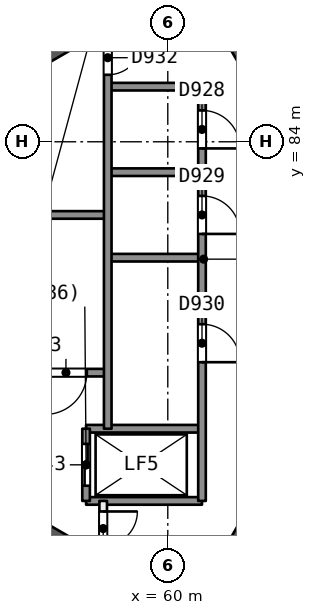
"""IFC4 building model, lengths in metres.
Left out: names, types, materials, properties, quantities, classifications, styles, units other than length and angle.
Written with IfcOpenShell. Run it as: python <this file> out.ifc"""

import sys

from ifc_helpers import new_model, si_unit, direction, frame, frame_2d, origin, place, context, subcontext, project, spatial, rectangle, extrude, element, fill, save


model = new_model("IFC4")
c1 = context("Model", 3, precision=1e-05, world=origin(), true_north=direction((0.0, 1.0)))
c2 = subcontext(c1, "Body", "Model", "MODEL_VIEW")
j1 = project(units=[si_unit("LENGTHUNIT", "METRE"), si_unit("PLANEANGLEUNIT", "RADIAN")], contexts=[c1])
p1 = place(None, origin())
s1 = spatial("IfcSite", under=j1, at=p1, CompositionType="ELEMENT")
p2 = place(p1, origin())
s2 = spatial("IfcBuilding", under=s1, at=p2, CompositionType="ELEMENT")
p3 = place(p2, frame((0.0, 0.0, 178.5)))
s3 = spatial("IfcBuildingStorey", under=s2, at=p3, CompositionType="ELEMENT", Elevation=178.5)
p4 = place(p3, frame((65.682, 80.0, 0.0), z_axis=(0.0, 0.0, 1.0), x_axis=(-0.500000202252, 0.866025287014, 0.0)))
e1 = element("IfcWall", 1, at=p4, inside=s3, PredefinedType="SHEAR", context=c2, shape_type="SweptSolid", body=[
    extrude(rectangle(XDim=10.221, YDim=0.55, at=frame_2d((5.111, 0.0))), origin(), (0.0, 0.0, 1.0), 3.7),
])
p5 = place(p4, frame((0.791, 0.0, 0.0)))
e2 = element("IfcOpeningElement", 2, at=p5, cuts=e1, PredefinedType="OPENING", context=c2, shape_type="SweptSolid", body=[
    extrude(rectangle(XDim=1.2, YDim=2.1, at=frame_2d((0.6, 1.05))), frame((0.0, 0.286, 0.0), z_axis=(0.0, -1.0, 0.0), x_axis=(1.0, 0.0, 0.0)), (0.0, 0.0, 1.0), 0.571),
])
p6 = place(p3, frame((60.709, 88.614, 0.0), z_axis=(0.0, 0.0, 1.0), x_axis=(-0.866020164116, -0.500009075263, 0.0)))
e3 = element("IfcWall", 3, at=p6, inside=s3, PredefinedType="SHEAR", context=c2, shape_type="SweptSolid", body=[
    extrude(rectangle(XDim=14.058, YDim=0.55, at=frame_2d((7.029, 0.0))), origin(), (0.0, 0.0, 1.0), 3.7),
])
p7 = place(p3, frame((48.672, 78.336, 0.0), z_axis=(0.0, 0.0, 1.0), x_axis=(0.866023530946, -0.500003243837, 0.0)))
e4 = element("IfcWall", 4, at=p7, inside=s3, PredefinedType="SHEAR", context=c2, shape_type="SweptSolid", body=[
    extrude(rectangle(XDim=14.175, YDim=0.55, at=frame_2d((7.087, 0.0))), origin(), (0.0, 0.0, 1.0), 3.7),
])
p8 = place(p3, frame((60.709, 71.386, 0.0), z_axis=(0.0, 0.0, 1.0), x_axis=(0.500015938302, 0.866016201606, 0.0)))
e5 = element("IfcWall", 5, at=p8, inside=s3, PredefinedType="SHEAR", context=c2, shape_type="SweptSolid", body=[
    extrude(rectangle(XDim=10.105, YDim=0.55, at=frame_2d((5.053, 0.0))), origin(), (0.0, 0.0, 1.0), 3.7),
])
p9 = place(p8, frame((7.955, 0.0, 0.0)))
e6 = element("IfcOpeningElement", 6, at=p9, cuts=e5, PredefinedType="OPENING", context=c2, shape_type="SweptSolid", body=[
    extrude(rectangle(XDim=1.2, YDim=2.1, at=frame_2d((0.6, 1.05))), frame((0.0, 0.286, 0.0), z_axis=(0.0, -1.0, 0.0), x_axis=(1.0, 0.0, 0.0)), (0.0, 0.0, 1.0), 0.571),
])
p10 = place(p3, frame((65.589, 82.765, 0.0), z_axis=(0.0, 0.0, 1.0), x_axis=(-0.5000018851, 0.866024315419, 0.0)))
e7 = element("IfcWall", 7, at=p10, inside=s3, PredefinedType="PARTITIONING", context=c2, shape_type="SweptSolid", body=[
    extrude(rectangle(XDim=9.0, YDim=0.2, at=frame_2d((4.5, 0.0))), origin(), (0.0, 0.0, 1.0), 3.25),
])
p11 = place(p3, frame((61.224, 69.363, 0.0), z_axis=(0.0, 0.0, 1.0), x_axis=(0.499990139034, 0.866031096941, 0.0)))
e8 = element("IfcWall", 8, at=p11, inside=s3, PredefinedType="PARTITIONING", context=c2, shape_type="SweptSolid", body=[
    extrude(rectangle(XDim=9.0, YDim=0.2, at=frame_2d((4.5, 0.0))), origin(), (0.0, 0.0, 1.0), 3.25),
])
p12 = place(p3, frame((42.71, 82.722, 0.0), z_axis=(0.0, 0.0, 1.0), x_axis=(0.866026647012, 0.499997846661, 0.0)))
e9 = element("IfcWall", 9, at=p12, inside=s3, PredefinedType="SOLIDWALL", context=c2, shape_type="SweptSolid", body=[
    extrude(rectangle(XDim=53.206, YDim=0.3, at=frame_2d((26.603, 0.0))), origin(), (0.0, 0.0, 1.0), 3.25),
])
p13 = place(p12, frame((30.391, 0.0, 0.0)))
e10 = element("IfcOpeningElement", 10, at=p13, cuts=e9, PredefinedType="OPENING", context=c2, shape_type="SweptSolid", body=[
    extrude(rectangle(XDim=2.4, YDim=2.4, at=frame_2d((1.2, 1.2))), frame((0.0, 0.161, 0.0), z_axis=(0.0, -1.0, 0.0), x_axis=(1.0, 0.0, 0.0)), (0.0, 0.0, 1.0), 0.321),
])
p14 = place(p12, frame((41.356, 0.0, 0.0)))
e11 = element("IfcOpeningElement", 11, at=p14, cuts=e9, PredefinedType="OPENING", context=c2, shape_type="SweptSolid", body=[
    extrude(rectangle(XDim=2.4, YDim=2.4, at=frame_2d((1.2, 1.2))), frame((0.0, 0.161, 0.0), z_axis=(0.0, -1.0, 0.0), x_axis=(1.0, 0.0, 0.0)), (0.0, 0.0, 1.0), 0.321),
])
p15 = place(p12, frame((19.635, 0.0, 0.0)))
e12 = element("IfcOpeningElement", 12, at=p15, cuts=e9, PredefinedType="OPENING", context=c2, shape_type="SweptSolid", body=[
    extrude(rectangle(XDim=2.4, YDim=2.4, at=frame_2d((1.2, 1.2))), frame((0.0, 0.161, 0.0), z_axis=(0.0, -1.0, 0.0), x_axis=(1.0, 0.0, 0.0)), (0.0, 0.0, 1.0), 0.321),
])
p16 = place(p12, frame((9.4, 0.0, 0.0)))
e13 = element("IfcOpeningElement", 13, at=p16, cuts=e9, PredefinedType="OPENING", context=c2, shape_type="SweptSolid", body=[
    extrude(rectangle(XDim=2.4, YDim=2.4, at=frame_2d((1.2, 1.2))), frame((0.0, 0.161, 0.0), z_axis=(0.0, -1.0, 0.0), x_axis=(1.0, 0.0, 0.0)), (0.0, 0.0, 1.0), 0.321),
])
p17 = place(p12, frame((26.404, 0.0, 0.9)))
e14 = element("IfcOpeningElement", 14, at=p17, cuts=e9, PredefinedType="OPENING", context=c2, shape_type="SweptSolid", body=[
    extrude(rectangle(XDim=1.8, YDim=1.5, at=frame_2d((0.9, 0.75))), frame((0.0, 0.161, 0.0), z_axis=(0.0, -1.0, 0.0), x_axis=(1.0, 0.0, 0.0)), (0.0, 0.0, 1.0), 0.321),
])
p18 = place(p12, frame((23.442, 0.0, 0.9)))
e15 = element("IfcOpeningElement", 15, at=p18, cuts=e9, PredefinedType="OPENING", context=c2, shape_type="SweptSolid", body=[
    extrude(rectangle(XDim=1.8, YDim=1.5, at=frame_2d((0.9, 0.75))), frame((0.0, 0.161, 0.0), z_axis=(0.0, -1.0, 0.0), x_axis=(1.0, 0.0, 0.0)), (0.0, 0.0, 1.0), 0.321),
])
p19 = place(p3, frame((88.788, 50.676, 0.0), z_axis=(0.0, 0.0, 1.0), x_axis=(-0.866026647012, 0.499997846661, 0.0)))
e16 = element("IfcWall", 16, at=p19, inside=s3, PredefinedType="SOLIDWALL", context=c2, shape_type="SweptSolid", body=[
    extrude(rectangle(XDim=53.206, YDim=0.3, at=frame_2d((26.603, 0.0))), origin(), (0.0, 0.0, 1.0), 3.25),
])
p20 = place(p19, frame((31.015, 0.0, 0.0)))
e17 = element("IfcOpeningElement", 17, at=p20, cuts=e16, PredefinedType="OPENING", context=c2, shape_type="SweptSolid", body=[
    extrude(rectangle(XDim=2.4, YDim=2.4, at=frame_2d((1.2, 1.2))), frame((0.0, 0.161, 0.0), z_axis=(0.0, -1.0, 0.0), x_axis=(1.0, 0.0, 0.0)), (0.0, 0.0, 1.0), 0.321),
])
p21 = place(p19, frame((41.356, 0.0, 0.0)))
e18 = element("IfcOpeningElement", 18, at=p21, cuts=e16, PredefinedType="OPENING", context=c2, shape_type="SweptSolid", body=[
    extrude(rectangle(XDim=2.4, YDim=2.4, at=frame_2d((1.2, 1.2))), frame((0.0, 0.161, 0.0), z_axis=(0.0, -1.0, 0.0), x_axis=(1.0, 0.0, 0.0)), (0.0, 0.0, 1.0), 0.321),
])
p22 = place(p19, frame((20.726, 0.0, 0.0)))
e19 = element("IfcOpeningElement", 19, at=p22, cuts=e16, PredefinedType="OPENING", context=c2, shape_type="SweptSolid", body=[
    extrude(rectangle(XDim=2.4, YDim=2.4, at=frame_2d((1.2, 1.2))), frame((0.0, 0.161, 0.0), z_axis=(0.0, -1.0, 0.0), x_axis=(1.0, 0.0, 0.0)), (0.0, 0.0, 1.0), 0.321),
])
p23 = place(p19, frame((9.4, 0.0, 0.0)))
e20 = element("IfcOpeningElement", 20, at=p23, cuts=e16, PredefinedType="OPENING", context=c2, shape_type="SweptSolid", body=[
    extrude(rectangle(XDim=2.4, YDim=2.4, at=frame_2d((1.2, 1.2))), frame((0.0, 0.161, 0.0), z_axis=(0.0, -1.0, 0.0), x_axis=(1.0, 0.0, 0.0)), (0.0, 0.0, 1.0), 0.321),
])
p24 = place(p19, frame((26.338, 0.0, 0.0)))
e21 = element("IfcOpeningElement", 21, at=p24, cuts=e16, PredefinedType="OPENING", context=c2, shape_type="SweptSolid", body=[
    extrude(rectangle(XDim=2.4, YDim=2.4, at=frame_2d((1.2, 1.2))), frame((0.0, 0.161, 0.0), z_axis=(0.0, -1.0, 0.0), x_axis=(1.0, 0.0, 0.0)), (0.0, 0.0, 1.0), 0.321),
])
for number, where, z_axis, x_axis in (
    (22, (60.9, 85.45, 0.0), (0.0, 0.0, 1.0), (-1.0, 0.0, 0.0)),
    (23, (60.9, 83.2, 0.0), (0.0, 0.0, 1.0), (-1.0, 0.0, 0.0)),
):
    element("IfcWall", number, at=place(p3, frame(where, z_axis=z_axis, x_axis=x_axis)), inside=s3, PredefinedType="SOLIDWALL", context=c2, shape_type="SweptSolid", body=[
        extrude(rectangle(XDim=2.48, YDim=0.2, at=frame_2d((1.24, 0.0))), origin(), (0.0, 0.0, 1.0), 3.25),
    ])
p25 = place(p3, frame((58.42, 82.075, 0.0), z_axis=(0.0, 0.0, 1.0), x_axis=(-1.0, 0.0, 0.0)))
e24 = element("IfcWall", 24, at=p25, inside=s3, PredefinedType="SOLIDWALL", context=c2, shape_type="SweptSolid", body=[
    extrude(rectangle(XDim=7.7, YDim=0.2, at=frame_2d((3.85, 0.0))), origin(), (0.0, 0.0, 1.0), 3.25),
])
p26 = place(p3, frame((60.9, 80.95, 0.0), z_axis=(0.0, 0.0, 1.0), x_axis=(-1.0, 0.0, 0.0)))
e25 = element("IfcWall", 25, at=p26, inside=s3, PredefinedType="SOLIDWALL", context=c2, shape_type="SweptSolid", body=[
    extrude(rectangle(XDim=2.48, YDim=0.2, at=frame_2d((1.24, 0.0))), origin(), (0.0, 0.0, 1.0), 3.25),
])
p27 = place(p3, frame((58.42, 77.925, 0.0), z_axis=(0.0, 0.0, 1.0), x_axis=(-1.0, 0.0, 0.0)))
e26 = element("IfcWall", 26, at=p27, inside=s3, PredefinedType="SOLIDWALL", context=c2, shape_type="SweptSolid", body=[
    extrude(rectangle(XDim=7.7, YDim=0.2, at=frame_2d((3.85, 0.0))), origin(), (0.0, 0.0, 1.0), 3.25),
])
p28 = place(p27, frame((0.55, 0.0, 0.0)))
e27 = element("IfcOpeningElement", 27, at=p28, cuts=e26, PredefinedType="OPENING", context=c2, shape_type="SweptSolid", body=[
    extrude(rectangle(XDim=1.1, YDim=2.1, at=frame_2d((0.55, 1.05))), frame((0.0, 0.11, 0.0), z_axis=(0.0, -1.0, 0.0), x_axis=(1.0, 0.0, 0.0)), (0.0, 0.0, 1.0), 0.221),
])
for number, where, z_axis, x_axis in (
    (28, (60.9, 76.45, 0.0), (0.0, 0.0, 1.0), (-1.0, 0.0, 0.0)),
    (29, (60.9, 74.55, 0.0), (0.0, 0.0, 1.0), (-1.0, 0.0, 0.0)),
):
    element("IfcWall", number, at=place(p3, frame(where, z_axis=z_axis, x_axis=x_axis)), inside=s3, PredefinedType="SOLIDWALL", context=c2, shape_type="SweptSolid", body=[
        extrude(rectangle(XDim=3.05, YDim=0.2, at=frame_2d((1.525, 0.0))), origin(), (0.0, 0.0, 1.0), 3.25),
    ])
p29 = place(p3, frame((60.9, 85.45, 0.0), z_axis=(0.0, 0.0, 1.0), x_axis=(0.0, -1.0, 0.0)))
e30 = element("IfcWall", 30, at=p29, inside=s3, PredefinedType="SOLIDWALL", context=c2, shape_type="SweptSolid", body=[
    extrude(rectangle(XDim=10.9, YDim=0.2, at=frame_2d((5.45, 0.0))), origin(), (0.0, 0.0, 1.0), 3.25),
])
p30 = place(p29, frame((0.625, 0.0, 0.0)))
e31 = element("IfcOpeningElement", 31, at=p30, cuts=e30, PredefinedType="OPENING", context=c2, shape_type="SweptSolid", body=[
    extrude(rectangle(XDim=1.0, YDim=2.1, at=frame_2d((0.5, 1.05))), frame((0.0, 0.11, 0.0), z_axis=(0.0, -1.0, 0.0), x_axis=(1.0, 0.0, 0.0)), (0.0, 0.0, 1.0), 0.221),
])
p31 = place(p29, frame((2.875, 0.0, 0.0)))
e32 = element("IfcOpeningElement", 32, at=p31, cuts=e30, PredefinedType="OPENING", context=c2, shape_type="SweptSolid", body=[
    extrude(rectangle(XDim=1.0, YDim=2.1, at=frame_2d((0.5, 1.05))), frame((0.0, 0.11, 0.0), z_axis=(0.0, -1.0, 0.0), x_axis=(1.0, 0.0, 0.0)), (0.0, 0.0, 1.0), 0.221),
])
p32 = place(p29, frame((6.25, 0.0, 0.0)))
e33 = element("IfcOpeningElement", 33, at=p32, cuts=e30, PredefinedType="OPENING", context=c2, shape_type="SweptSolid", body=[
    extrude(rectangle(XDim=1.0, YDim=2.1, at=frame_2d((0.5, 1.05))), frame((0.0, 0.11, 0.0), z_axis=(0.0, -1.0, 0.0), x_axis=(1.0, 0.0, 0.0)), (0.0, 0.0, 1.0), 0.221),
])
p33 = place(p3, frame((58.42, 86.974, 0.0), z_axis=(0.0, 0.0, 1.0), x_axis=(0.0, -1.0, 0.0)))
e34 = element("IfcWall", 34, at=p33, inside=s3, PredefinedType="SOLIDWALL", context=c2, shape_type="SweptSolid", body=[
    extrude(rectangle(XDim=10.524, YDim=0.2, at=frame_2d((5.262, 0.0))), origin(), (0.0, 0.0, 1.0), 3.25),
])
p34 = place(p33, frame((0.312, 0.0, 0.0)))
e35 = element("IfcOpeningElement", 35, at=p34, cuts=e34, PredefinedType="OPENING", context=c2, shape_type="SweptSolid", body=[
    extrude(rectangle(XDim=0.9, YDim=2.1, at=frame_2d((0.45, 1.05))), frame((0.0, 0.11, 0.0), z_axis=(0.0, -1.0, 0.0), x_axis=(1.0, 0.0, 0.0)), (0.0, 0.0, 1.0), 0.221),
])
p35 = place(p3, frame((58.3, 74.55, 0.0), z_axis=(0.0, 0.0, 1.0), x_axis=(0.0, -1.0, 0.0)))
e36 = element("IfcWall", 36, at=p35, inside=s3, PredefinedType="PARTITIONING", context=c2, shape_type="SweptSolid", body=[
    extrude(rectangle(XDim=1.455, YDim=0.2, at=frame_2d((0.728, 0.0))), origin(), (0.0, 0.0, 1.0), 3.25),
])
p36 = place(p35, frame((0.278, 0.0, 0.0)))
e37 = element("IfcOpeningElement", 37, at=p36, cuts=e36, PredefinedType="OPENING", context=c2, shape_type="SweptSolid", body=[
    extrude(rectangle(XDim=0.9, YDim=2.1, at=frame_2d((0.45, 1.05))), frame((0.0, 0.11, 0.0), z_axis=(0.0, -1.0, 0.0), x_axis=(1.0, 0.0, 0.0)), (0.0, 0.0, 1.0), 0.221),
])
p37 = place(p3, frame((57.85, 76.45, 0.0), z_axis=(0.0, 0.0, 1.0), x_axis=(0.0, -1.0, 0.0)))
e38 = element("IfcWall", 38, at=p37, inside=s3, PredefinedType="SOLIDWALL", context=c2, shape_type="SweptSolid", body=[
    extrude(rectangle(XDim=1.9, YDim=0.2, at=frame_2d((0.95, 0.0))), origin(), (0.0, 0.0, 1.0), 3.25),
])
p38 = place(p37, frame((0.4, 0.0, 0.0)))
e39 = element("IfcOpeningElement", 39, at=p38, cuts=e38, PredefinedType="OPENING", context=c2, shape_type="SweptSolid", body=[
    extrude(rectangle(XDim=1.1, YDim=2.1, at=frame_2d((0.55, 1.05))), frame((0.0, 0.11, 0.0), z_axis=(0.0, -1.0, 0.0), x_axis=(1.0, 0.0, 0.0)), (0.0, 0.0, 1.0), 0.221),
])
p39 = place(p38, origin())
e40 = element("IfcDoor", 40, at=p39, inside=s3, OperationType="SLIDING_TO_RIGHT", PredefinedType="NOTDEFINED", context=c2, shape_type="SweptSolid", body=[
    extrude(rectangle(XDim=1.1, YDim=2.1, at=frame_2d((0.55, 1.05))), frame((0.0, 0.025, 0.0), z_axis=(0.0, -1.0, 0.0), x_axis=(1.0, 0.0, 0.0)), (0.0, 0.0, 1.0), 0.05),
])
fill(e39, e40)
p40 = place(p30, origin())
e41 = element("IfcDoor", 41, at=p40, inside=s3, OperationType="SINGLE_SWING_RIGHT", PredefinedType="NOTDEFINED", context=c2, shape_type="SweptSolid", body=[
    extrude(rectangle(XDim=1.0, YDim=2.1, at=frame_2d((0.5, 1.05))), frame((0.0, 0.025, 0.0), z_axis=(0.0, -1.0, 0.0), x_axis=(1.0, 0.0, 0.0)), (0.0, 0.0, 1.0), 0.05),
])
fill(e31, e41)
p41 = place(p31, origin())
e42 = element("IfcDoor", 42, at=p41, inside=s3, OperationType="SINGLE_SWING_RIGHT", PredefinedType="NOTDEFINED", context=c2, shape_type="SweptSolid", body=[
    extrude(rectangle(XDim=1.0, YDim=2.1, at=frame_2d((0.5, 1.05))), frame((0.0, 0.025, 0.0), z_axis=(0.0, -1.0, 0.0), x_axis=(1.0, 0.0, 0.0)), (0.0, 0.0, 1.0), 0.05),
])
fill(e32, e42)
p42 = place(p32, origin())
e43 = element("IfcDoor", 43, at=p42, inside=s3, OperationType="SINGLE_SWING_RIGHT", PredefinedType="NOTDEFINED", context=c2, shape_type="SweptSolid", body=[
    extrude(rectangle(XDim=1.0, YDim=2.1, at=frame_2d((0.5, 1.05))), frame((0.0, 0.025, 0.0), z_axis=(0.0, -1.0, 0.0), x_axis=(1.0, 0.0, 0.0)), (0.0, 0.0, 1.0), 0.05),
])
fill(e33, e43)
p43 = place(p36, origin())
e44 = element("IfcDoor", 44, at=p43, inside=s3, OperationType="SINGLE_SWING_LEFT", PredefinedType="NOTDEFINED", context=c2, shape_type="SweptSolid", body=[
    extrude(rectangle(XDim=0.9, YDim=2.1, at=frame_2d((0.45, 1.05))), frame((0.0, 0.025, 0.0), z_axis=(0.0, -1.0, 0.0), x_axis=(1.0, 0.0, 0.0)), (0.0, 0.0, 1.0), 0.05),
])
fill(e37, e44)
p44 = place(p34, origin())
e45 = element("IfcDoor", 45, at=p44, inside=s3, OperationType="SINGLE_SWING_LEFT", PredefinedType="NOTDEFINED", context=c2, shape_type="SweptSolid", body=[
    extrude(rectangle(XDim=0.9, YDim=2.1, at=frame_2d((0.45, 1.05))), frame((0.0, 0.025, 0.0), z_axis=(0.0, -1.0, 0.0), x_axis=(1.0, 0.0, 0.0)), (0.0, 0.0, 1.0), 0.05),
])
fill(e35, e45)
p45 = place(p28, origin())
e46 = element("IfcDoor", 46, at=p45, inside=s3, OperationType="SINGLE_SWING_RIGHT", PredefinedType="NOTDEFINED", context=c2, shape_type="SweptSolid", body=[
    extrude(rectangle(XDim=1.1, YDim=2.1, at=frame_2d((0.55, 1.05))), frame((0.0, 0.025, 0.0), z_axis=(0.0, -1.0, 0.0), x_axis=(1.0, 0.0, 0.0)), (0.0, 0.0, 1.0), 0.05),
])
fill(e27, e46)
save(model, sys.argv[1])
